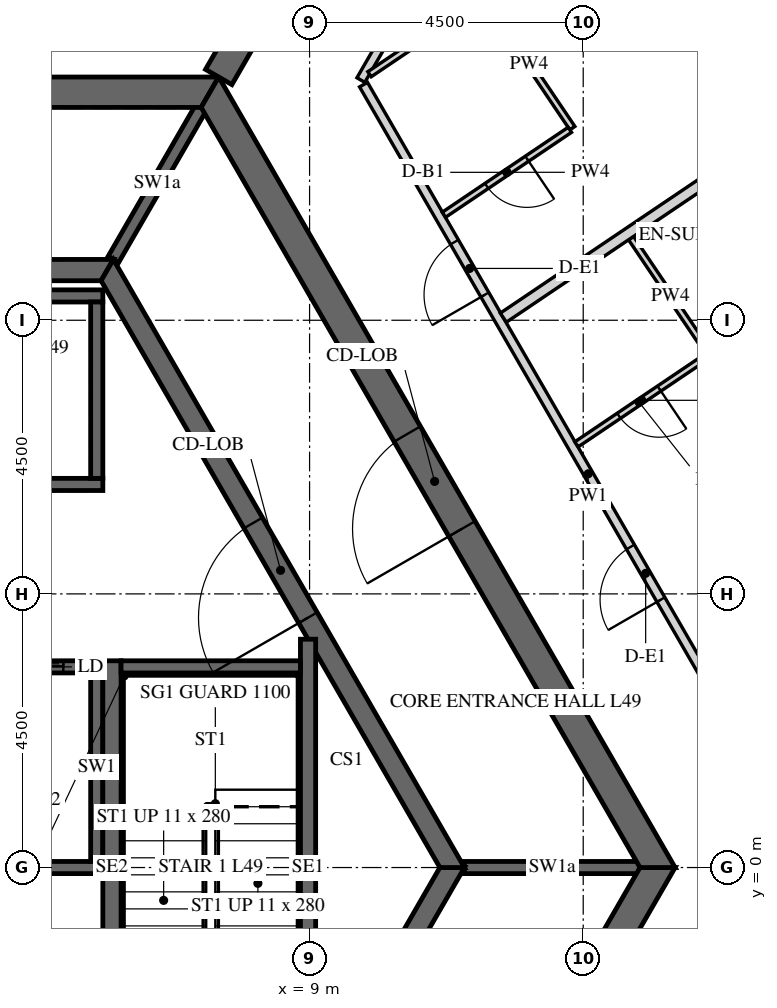
"""IFC4 building model, lengths in metres.
Left out: names, types, materials, properties, quantities, classifications, styles, units other than length and angle.
Written with IfcOpenShell. Run it as: python <this file> out.ifc"""

import sys

from ifc_helpers import new_model, si_unit, direction, frame, frame_2d, origin, place, context, subcontext, project, spatial, polyline, rectangle, outline, extrude, element, fill, save


model = new_model("IFC4")
c1 = context("Model", 3, precision=1e-05, world=origin(), true_north=direction((0.0, 1.0)))
c2 = subcontext(c1, "Body", "Model", "MODEL_VIEW")
j1 = project(units=[si_unit("LENGTHUNIT", "METRE"), si_unit("PLANEANGLEUNIT", "RADIAN")], contexts=[c1])
p1 = place(None, origin())
s1 = spatial("IfcSite", under=j1, at=p1, CompositionType="ELEMENT")
p2 = place(p1, origin())
s2 = spatial("IfcBuilding", under=s1, at=p2, CompositionType="ELEMENT")
p3 = place(p2, frame((0.0, 0.0, 207.3)))
s3 = spatial("IfcBuildingStorey", under=s2, at=p3, CompositionType="ELEMENT", Elevation=207.3)
p4 = place(p3, frame((7.361, -12.75, -0.15), z_axis=(0.0, 0.0, 1.0), x_axis=(0.50000571537, 0.866022103989, 0.0)))
e1 = element("IfcWall", 1, at=p4, inside=s3, PredefinedType="SHEAR", context=c2, shape_type="SweptSolid", body=[
    extrude(outline(polyline([(-0.144, -0.25), (14.867, -0.25), (14.578, 0.25), (0.144, 0.25), (-0.144, -0.25)])), origin(), (0.0, 0.0, 1.0), 3.9),
])
p5 = place(p4, frame((6.49, 0.0, 0.15)))
e2 = element("IfcOpeningElement", 2, at=p5, cuts=e1, PredefinedType="OPENING", context=c2, shape_type="SweptSolid", body=[
    extrude(rectangle(XDim=1.8, YDim=2.4, at=frame_2d((0.9, 1.2))), frame((0.0, 0.26, 0.0), z_axis=(0.0, -1.0, 0.0), x_axis=(1.0, 0.0, 0.0)), (0.0, 0.0, 1.0), 0.52),
])
p6 = place(p3, frame((14.722, 0.0, -0.15), z_axis=(0.0, 0.0, 1.0), x_axis=(-0.50000571537, 0.866022103989, 0.0)))
e3 = element("IfcWall", 3, at=p6, inside=s3, PredefinedType="SHEAR", context=c2, shape_type="SweptSolid", body=[
    extrude(outline(polyline([(-0.144, -0.25), (14.867, -0.25), (14.578, 0.25), (0.144, 0.25), (-0.144, -0.25)])), origin(), (0.0, 0.0, 1.0), 3.9),
])
p7 = place(p6, frame((6.432, 0.0, 0.15)))
e4 = element("IfcOpeningElement", 4, at=p7, cuts=e3, PredefinedType="OPENING", context=c2, shape_type="SweptSolid", body=[
    extrude(rectangle(XDim=1.8, YDim=2.4, at=frame_2d((0.9, 1.2))), frame((0.0, 0.26, 0.0), z_axis=(0.0, -1.0, 0.0), x_axis=(1.0, 0.0, 0.0)), (0.0, 0.0, 1.0), 0.52),
])
p8 = place(p3, frame((7.361, 12.75, -0.15), z_axis=(0.0, 0.0, 1.0), x_axis=(-1.0, 0.0, 0.0)))
e5 = element("IfcWall", 5, at=p8, inside=s3, PredefinedType="SHEAR", context=c2, shape_type="SweptSolid", body=[
    extrude(outline(polyline([(-0.144, -0.25), (14.866, -0.25), (14.578, 0.25), (0.144, 0.25), (-0.144, -0.25)])), origin(), (0.0, 0.0, 1.0), 3.9),
])
p9 = place(p8, frame((6.761, 0.0, 0.15)))
e6 = element("IfcOpeningElement", 6, at=p9, cuts=e5, PredefinedType="OPENING", context=c2, shape_type="SweptSolid", body=[
    extrude(rectangle(XDim=1.2, YDim=2.4, at=frame_2d((0.6, 1.2))), frame((0.0, 0.26, 0.0), z_axis=(0.0, -1.0, 0.0), x_axis=(1.0, 0.0, 0.0)), (0.0, 0.0, 1.0), 0.52),
])
p10 = place(p3, frame((7.506, 13.0, -0.15), z_axis=(0.0, 0.0, 1.0), x_axis=(0.499988271576, 0.866032175087, 0.0)))
e7 = element("IfcWall", 7, at=p10, inside=s3, PredefinedType="SHEAR", context=c2, shape_type="SweptSolid", body=[
    extrude(rectangle(XDim=15.424, YDim=0.5, at=frame_2d((7.712, 0.0))), origin(), (0.0, 0.0, 1.0), 3.9),
])
p11 = place(p10, frame((6.812, 0.0, 0.15)))
e8 = element("IfcOpeningElement", 8, at=p11, cuts=e7, PredefinedType="OPENING", context=c2, shape_type="SweptSolid", body=[
    extrude(rectangle(XDim=1.8, YDim=2.4, at=frame_2d((0.9, 1.2))), frame((0.0, 0.26, 0.0), z_axis=(0.0, -1.0, 0.0), x_axis=(1.0, 0.0, 0.0)), (0.0, 0.0, 1.0), 0.52),
])
p12 = place(p3, frame((5.673, -9.825, -0.15), z_axis=(0.0, 0.0, 1.0), x_axis=(0.499995046907, 0.866028263435, 0.0)))
e9 = element("IfcWall", 9, at=p12, inside=s3, PredefinedType="SHEAR", context=c2, shape_type="SweptSolid", body=[
    extrude(outline(polyline([(-0.101, -0.175), (11.446, -0.175), (11.244, 0.175), (0.101, 0.175), (-0.101, -0.175)])), origin(), (0.0, 0.0, 1.0), 3.9),
])
p13 = place(p12, frame((4.801, 0.0, 0.15)))
e10 = element("IfcOpeningElement", 10, at=p13, cuts=e9, PredefinedType="OPENING", context=c2, shape_type="SweptSolid", body=[
    extrude(rectangle(XDim=1.8, YDim=2.4, at=frame_2d((0.9, 1.2))), frame((0.0, 0.185, 0.0), z_axis=(0.0, -1.0, 0.0), x_axis=(1.0, 0.0, 0.0)), (0.0, 0.0, 1.0), 0.37),
])
p14 = place(p3, frame((11.345, 0.0, -0.15), z_axis=(0.0, 0.0, 1.0), x_axis=(-0.499995046907, 0.866028263435, 0.0)))
e11 = element("IfcWall", 11, at=p14, inside=s3, PredefinedType="SHEAR", context=c2, shape_type="SweptSolid", body=[
    extrude(outline(polyline([(-0.101, -0.175), (11.446, -0.175), (11.244, 0.175), (0.101, 0.175), (-0.101, -0.175)])), origin(), (0.0, 0.0, 1.0), 3.9),
])
p15 = place(p14, frame((4.744, 0.0, 0.15)))
e12 = element("IfcOpeningElement", 12, at=p15, cuts=e11, PredefinedType="OPENING", context=c2, shape_type="SweptSolid", body=[
    extrude(rectangle(XDim=1.8, YDim=2.4, at=frame_2d((0.9, 1.2))), frame((0.0, 0.185, 0.0), z_axis=(0.0, -1.0, 0.0), x_axis=(1.0, 0.0, 0.0)), (0.0, 0.0, 1.0), 0.37),
])
p16 = place(p3, frame((5.673, 9.825, -0.15), z_axis=(0.0, 0.0, 1.0), x_axis=(-1.0, 0.0, 0.0)))
e13 = element("IfcWall", 13, at=p16, inside=s3, PredefinedType="SHEAR", context=c2, shape_type="SweptSolid", body=[
    extrude(outline(polyline([(-0.101, -0.175), (11.446, -0.175), (11.244, 0.175), (0.101, 0.175), (-0.101, -0.175)])), origin(), (0.0, 0.0, 1.0), 3.9),
])
p17 = place(p3, frame((-5.6, 6.3, -0.25), z_axis=(0.0, 0.0, 1.0), x_axis=(1.0, 0.0, 0.0)))
e14 = element("IfcWall", 14, at=p17, inside=s3, PredefinedType="SHEAR", context=c2, shape_type="SweptSolid", body=[
    extrude(rectangle(XDim=11.2, YDim=0.2, at=frame_2d((5.6, 0.0))), origin(), (0.0, 0.0, 1.0), 3.9),
])
p18 = place(p17, frame((8.45, 0.0, 0.25)))
e15 = element("IfcOpeningElement", 15, at=p18, cuts=e14, PredefinedType="OPENING", context=c2, shape_type="SweptSolid", body=[
    extrude(rectangle(XDim=0.9, YDim=2.1, at=frame_2d((0.45, 1.05))), frame((0.0, 0.11, 0.0), z_axis=(0.0, -1.0, 0.0), x_axis=(1.0, 0.0, 0.0)), (0.0, 0.0, 1.0), 0.22),
])
p19 = place(p17, frame((0.65, 0.0, 0.25)))
e16 = element("IfcOpeningElement", 16, at=p19, cuts=e14, PredefinedType="OPENING", context=c2, shape_type="SweptSolid", body=[
    extrude(rectangle(XDim=1.1, YDim=2.1, at=frame_2d((0.55, 1.05))), frame((0.0, 0.11, 0.0), z_axis=(0.0, -1.0, 0.0), x_axis=(1.0, 0.0, 0.0)), (0.0, 0.0, 1.0), 0.22),
])
p20 = place(p17, frame((2.85, 0.0, 0.25)))
e17 = element("IfcOpeningElement", 17, at=p20, cuts=e14, PredefinedType="OPENING", context=c2, shape_type="SweptSolid", body=[
    extrude(rectangle(XDim=1.1, YDim=2.1, at=frame_2d((0.55, 1.05))), frame((0.0, 0.11, 0.0), z_axis=(0.0, -1.0, 0.0), x_axis=(1.0, 0.0, 0.0)), (0.0, 0.0, 1.0), 0.22),
])
p21 = place(p17, frame((5.05, 0.0, 0.25)))
e18 = element("IfcOpeningElement", 18, at=p21, cuts=e14, PredefinedType="OPENING", context=c2, shape_type="SweptSolid", body=[
    extrude(rectangle(XDim=1.1, YDim=2.1, at=frame_2d((0.55, 1.05))), frame((0.0, 0.11, 0.0), z_axis=(0.0, -1.0, 0.0), x_axis=(1.0, 0.0, 0.0)), (0.0, 0.0, 1.0), 0.22),
])
p22 = place(p3, frame((-5.6, 9.4, -0.25), z_axis=(0.0, 0.0, 1.0), x_axis=(1.0, 0.0, 0.0)))
e19 = element("IfcWall", 19, at=p22, inside=s3, PredefinedType="SHEAR", context=c2, shape_type="SweptSolid", body=[
    extrude(rectangle(XDim=11.2, YDim=0.2, at=frame_2d((5.6, 0.0))), origin(), (0.0, 0.0, 1.0), 3.9),
])
p23 = place(p3, frame((5.5, 6.4, -0.25), z_axis=(0.0, 0.0, 1.0), x_axis=(0.0, 1.0, 0.0)))
e20 = element("IfcWall", 20, at=p23, inside=s3, PredefinedType="SHEAR", context=c2, shape_type="SweptSolid", body=[
    extrude(rectangle(XDim=2.9, YDim=0.2, at=frame_2d((1.45, 0.0))), origin(), (0.0, 0.0, 1.0), 3.9),
])
p24 = place(p3, frame((-5.6, 3.3, -0.25), z_axis=(0.0, 0.0, 1.0), x_axis=(1.0, 0.0, 0.0)))
e21 = element("IfcWall", 21, at=p24, inside=s3, PredefinedType="SHEAR", context=c2, shape_type="SweptSolid", body=[
    extrude(rectangle(XDim=11.2, YDim=0.2, at=frame_2d((5.6, 0.0))), origin(), (0.0, 0.0, 1.0), 3.9),
])
p25 = place(p24, frame((0.65, 0.0, 0.25)))
e22 = element("IfcOpeningElement", 22, at=p25, cuts=e21, PredefinedType="OPENING", context=c2, shape_type="SweptSolid", body=[
    extrude(rectangle(XDim=1.1, YDim=2.1, at=frame_2d((0.55, 1.05))), frame((0.0, 0.11, 0.0), z_axis=(0.0, -1.0, 0.0), x_axis=(1.0, 0.0, 0.0)), (0.0, 0.0, 1.0), 0.22),
])
p26 = place(p24, frame((2.85, 0.0, 0.25)))
e23 = element("IfcOpeningElement", 23, at=p26, cuts=e21, PredefinedType="OPENING", context=c2, shape_type="SweptSolid", body=[
    extrude(rectangle(XDim=1.1, YDim=2.1, at=frame_2d((0.55, 1.05))), frame((0.0, 0.11, 0.0), z_axis=(0.0, -1.0, 0.0), x_axis=(1.0, 0.0, 0.0)), (0.0, 0.0, 1.0), 0.22),
])
p27 = place(p24, frame((5.05, 0.0, 0.25)))
e24 = element("IfcOpeningElement", 24, at=p27, cuts=e21, PredefinedType="OPENING", context=c2, shape_type="SweptSolid", body=[
    extrude(rectangle(XDim=1.1, YDim=2.1, at=frame_2d((0.55, 1.05))), frame((0.0, 0.11, 0.0), z_axis=(0.0, -1.0, 0.0), x_axis=(1.0, 0.0, 0.0)), (0.0, 0.0, 1.0), 0.22),
])
p28 = place(p24, frame((7.25, 0.0, 0.25)))
e25 = element("IfcOpeningElement", 25, at=p28, cuts=e21, PredefinedType="OPENING", context=c2, shape_type="SweptSolid", body=[
    extrude(rectangle(XDim=1.1, YDim=2.1, at=frame_2d((0.55, 1.05))), frame((0.0, 0.11, 0.0), z_axis=(0.0, -1.0, 0.0), x_axis=(1.0, 0.0, 0.0)), (0.0, 0.0, 1.0), 0.22),
])
p29 = place(p24, frame((9.45, 0.0, 0.25)))
e26 = element("IfcOpeningElement", 26, at=p29, cuts=e21, PredefinedType="OPENING", context=c2, shape_type="SweptSolid", body=[
    extrude(rectangle(XDim=1.1, YDim=2.1, at=frame_2d((0.55, 1.05))), frame((0.0, 0.11, 0.0), z_axis=(0.0, -1.0, 0.0), x_axis=(1.0, 0.0, 0.0)), (0.0, 0.0, 1.0), 0.22),
])
p30 = place(p3, frame((-5.6, 0.0, -0.25), z_axis=(0.0, 0.0, 1.0), x_axis=(1.0, 0.0, 0.0)))
e27 = element("IfcWall", 27, at=p30, inside=s3, PredefinedType="SHEAR", context=c2, shape_type="SweptSolid", body=[
    extrude(rectangle(XDim=11.2, YDim=0.2, at=frame_2d((5.6, 0.0))), origin(), (0.0, 0.0, 1.0), 3.9),
])
p31 = place(p3, frame((5.5, 0.1, -0.25), z_axis=(0.0, 0.0, 1.0), x_axis=(0.0, 1.0, 0.0)))
e28 = element("IfcWall", 28, at=p31, inside=s3, PredefinedType="SHEAR", context=c2, shape_type="SweptSolid", body=[
    extrude(rectangle(XDim=3.1, YDim=0.2, at=frame_2d((1.55, 0.0))), origin(), (0.0, 0.0, 1.0), 3.9),
])
for number, where, z_axis, x_axis in (
    (29, (11.547, 0.0, -0.15), (0.0, 0.0, 1.0), (1.0, 0.0, 0.0)),
    (30, (5.773, 10.0, -0.15), (0.0, 0.0, 1.0), (0.5, 0.866, 0.0)),
):
    element("IfcWall", number, at=place(p3, frame(where, z_axis=z_axis, x_axis=x_axis)), inside=s3, PredefinedType="SHEAR", context=c2, shape_type="SweptSolid", body=[
        extrude(rectangle(XDim=2.887, YDim=0.2, at=frame_2d((1.443, 0.0))), origin(), (0.0, 0.0, 1.0), 3.9),
    ])
p32 = place(p3, frame((5.75, -3.4, -0.25), z_axis=(0.0, 0.0, 1.0), x_axis=(0.0, 1.0, 0.0)))
e31 = element("IfcWall", 31, at=p32, inside=s3, PredefinedType="SHEAR", context=c2, shape_type="SweptSolid", body=[
    extrude(rectangle(XDim=6.8, YDim=0.3, at=frame_2d((3.4, 0.0))), origin(), (0.0, 0.0, 1.0), 3.9),
])
p33 = place(p3, frame((8.975, -3.755, -0.25), z_axis=(0.0, 0.0, 1.0), x_axis=(0.0, 1.0, 0.0)))
e32 = element("IfcWall", 32, at=p33, inside=s3, PredefinedType="SHEAR", context=c2, shape_type="SweptSolid", body=[
    extrude(rectangle(XDim=7.51, YDim=0.25, at=frame_2d((3.755, 0.0))), origin(), (0.0, 0.0, 1.0), 3.9),
])
p34 = place(p3, frame((5.9, 3.3, -0.25), z_axis=(0.0, 0.0, 1.0), x_axis=(1.0, 0.0, 0.0)))
e33 = element("IfcWall", 33, at=p34, inside=s3, PredefinedType="SHEAR", context=c2, shape_type="SweptSolid", body=[
    extrude(rectangle(XDim=2.95, YDim=0.2, at=frame_2d((1.475, 0.0))), origin(), (0.0, 0.0, 1.0), 3.9),
])
p35 = place(p3, frame((10.887, -11.144, 0.0), z_axis=(0.0, 0.0, 1.0), x_axis=(0.500006037985, 0.866021917724, 0.0)))
e34 = element("IfcWall", 34, at=p35, inside=s3, PredefinedType="PARTITIONING", context=c2, shape_type="SweptSolid", body=[
    extrude(rectangle(XDim=12.867, YDim=0.15, at=frame_2d((6.434, 0.0))), origin(), (0.0, 0.0, 1.0), 2.988),
])
p36 = place(p35, frame((3.525, 0.0, 0.0)))
e35 = element("IfcOpeningElement", 35, at=p36, cuts=e34, PredefinedType="OPENING", context=c2, shape_type="SweptSolid", body=[
    extrude(rectangle(XDim=1.0, YDim=2.1, at=frame_2d((0.5, 1.05))), frame((0.0, 0.085, 0.0), z_axis=(0.0, -1.0, 0.0), x_axis=(1.0, 0.0, 0.0)), (0.0, 0.0, 1.0), 0.17),
])
p37 = place(p3, frame((17.277, 0.075, 0.0), z_axis=(0.0, 0.0, 1.0), x_axis=(-0.499988884089, 0.866031821464, 0.0)))
e36 = element("IfcWall", 36, at=p37, inside=s3, PredefinedType="PARTITIONING", context=c2, shape_type="SweptSolid", body=[
    extrude(rectangle(XDim=14.78, YDim=0.15, at=frame_2d((7.39, 0.0))), origin(), (0.0, 0.0, 1.0), 2.988),
])
p38 = place(p37, frame((1.001, 0.0, 0.0)))
e37 = element("IfcOpeningElement", 37, at=p38, cuts=e36, PredefinedType="OPENING", context=c2, shape_type="SweptSolid", body=[
    extrude(rectangle(XDim=1.0, YDim=2.1, at=frame_2d((0.5, 1.05))), frame((0.0, 0.085, 0.0), z_axis=(0.0, -1.0, 0.0), x_axis=(1.0, 0.0, 0.0)), (0.0, 0.0, 1.0), 0.17),
])
p39 = place(p37, frame((5.0, 0.0, 0.0)))
e38 = element("IfcOpeningElement", 38, at=p39, cuts=e36, PredefinedType="OPENING", context=c2, shape_type="SweptSolid", body=[
    extrude(rectangle(XDim=1.0, YDim=2.1, at=frame_2d((0.5, 1.05))), frame((0.0, 0.085, 0.0), z_axis=(0.0, -1.0, 0.0), x_axis=(1.0, 0.0, 0.0)), (0.0, 0.0, 1.0), 0.17),
])
p40 = place(p37, frame((10.79, 0.0, 0.0)))
e39 = element("IfcOpeningElement", 39, at=p40, cuts=e36, PredefinedType="OPENING", context=c2, shape_type="SweptSolid", body=[
    extrude(rectangle(XDim=1.0, YDim=2.1, at=frame_2d((0.5, 1.05))), frame((0.0, 0.085, 0.0), z_axis=(0.0, -1.0, 0.0), x_axis=(1.0, 0.0, 0.0)), (0.0, 0.0, 1.0), 0.17),
])
p41 = place(p3, frame((9.844, 12.95, 0.0), z_axis=(0.0, 0.0, 1.0), x_axis=(0.500003831281, 0.866023191782, 0.0)))
e40 = element("IfcWall", 40, at=p41, inside=s3, PredefinedType="PARTITIONING", context=c2, shape_type="SweptSolid", body=[
    extrude(rectangle(XDim=7.786, YDim=0.15, at=frame_2d((3.893, 0.0))), origin(), (0.0, 0.0, 1.0), 2.988),
])
p42 = place(p3, frame((14.287, 10.351, 0.0), z_axis=(0.0, 0.0, 1.0), x_axis=(0.559204176839, -0.829029968461, 0.0)))
e41 = element("IfcWall", 41, at=p42, inside=s3, PredefinedType="PARTITIONING", context=c2, shape_type="SweptSolid", body=[
    extrude(rectangle(XDim=2.31, YDim=0.1, at=frame_2d((1.155, 0.0))), origin(), (0.0, 0.0, 1.0), 2.988),
])
p43 = place(p3, frame((15.537, 8.408, 0.0), z_axis=(0.0, 0.0, 1.0), x_axis=(-0.829051810631, -0.559171794076, 0.0)))
e42 = element("IfcWall", 42, at=p43, inside=s3, PredefinedType="PARTITIONING", context=c2, shape_type="SweptSolid", body=[
    extrude(rectangle(XDim=2.591, YDim=0.1, at=frame_2d((1.295, 0.0))), origin(), (0.0, 0.0, 1.0), 2.988),
])
p44 = place(p43, frame((0.95, 0.0, 0.0)))
e43 = element("IfcOpeningElement", 43, at=p44, cuts=e42, PredefinedType="OPENING", context=c2, shape_type="SweptSolid", body=[
    extrude(rectangle(XDim=0.8, YDim=2.1, at=frame_2d((0.4, 1.05))), frame((0.0, 0.06, 0.0), z_axis=(0.0, -1.0, 0.0), x_axis=(1.0, 0.0, 0.0)), (0.0, 0.0, 1.0), 0.12),
])
p45 = place(p3, frame((22.376, 15.915, 0.0), z_axis=(0.0, 0.0, 1.0), x_axis=(-0.829034008237, -0.559198187753, 0.0)))
e44 = element("IfcWall", 44, at=p45, inside=s3, PredefinedType="PARTITIONING", context=c2, shape_type="SweptSolid", body=[
    extrude(rectangle(XDim=12.291, YDim=0.18, at=frame_2d((6.145, 0.0))), origin(), (0.0, 0.0, 1.0), 2.988),
])
p46 = place(p3, frame((9.986, 13.046, 0.0), z_axis=(0.0, 0.0, 1.0), x_axis=(0.829043139518, 0.55918465002, 0.0)))
e45 = element("IfcWall", 45, at=p46, inside=s3, PredefinedType="PARTITIONING", context=c2, shape_type="SweptSolid", body=[
    extrude(rectangle(XDim=2.27, YDim=0.1, at=frame_2d((1.135, 0.0))), origin(), (0.0, 0.0, 1.0), 2.988),
])
p47 = place(p3, frame((11.896, 14.273, 0.0), z_axis=(0.0, 0.0, 1.0), x_axis=(0.559155442782, -0.829062838878, 0.0)))
e46 = element("IfcWall", 46, at=p47, inside=s3, PredefinedType="PARTITIONING", context=c2, shape_type="SweptSolid", body=[
    extrude(rectangle(XDim=2.55, YDim=0.1, at=frame_2d((1.275, 0.0))), origin(), (0.0, 0.0, 1.0), 2.988),
])
p48 = place(p3, frame((13.28, 12.132, 0.0), z_axis=(0.0, 0.0, 1.0), x_axis=(-0.829015218944, -0.559226042634, 0.0)))
e47 = element("IfcWall", 47, at=p48, inside=s3, PredefinedType="PARTITIONING", context=c2, shape_type="SweptSolid", body=[
    extrude(rectangle(XDim=2.498, YDim=0.1, at=frame_2d((1.249, 0.0))), origin(), (0.0, 0.0, 1.0), 2.988),
])
p49 = place(p48, frame((0.85, 0.0, 0.0)))
e48 = element("IfcOpeningElement", 48, at=p49, cuts=e47, PredefinedType="OPENING", context=c2, shape_type="SweptSolid", body=[
    extrude(rectangle(XDim=0.8, YDim=2.1, at=frame_2d((0.4, 1.05))), frame((0.0, 0.06, 0.0), z_axis=(0.0, -1.0, 0.0), x_axis=(1.0, 0.0, 0.0)), (0.0, 0.0, 1.0), 0.12),
])
p50 = place(p7, origin())
e49 = element("IfcDoor", 49, at=p50, inside=s3, OperationType="DOUBLE_DOOR_SINGLE_SWING", PredefinedType="DOOR", context=c2, shape_type="SweptSolid", body=[
    extrude(rectangle(XDim=1.8, YDim=2.4, at=frame_2d((0.9, 1.2))), frame((0.0, 0.025, 0.0), z_axis=(0.0, -1.0, 0.0), x_axis=(1.0, 0.0, 0.0)), (0.0, 0.0, 1.0), 0.05),
])
fill(e4, e49)
p51 = place(p15, origin())
e50 = element("IfcDoor", 50, at=p51, inside=s3, OperationType="DOUBLE_DOOR_SINGLE_SWING", PredefinedType="DOOR", context=c2, shape_type="SweptSolid", body=[
    extrude(rectangle(XDim=1.8, YDim=2.4, at=frame_2d((0.9, 1.2))), frame((0.0, 0.025, 0.0), z_axis=(0.0, -1.0, 0.0), x_axis=(1.0, 0.0, 0.0)), (0.0, 0.0, 1.0), 0.05),
])
fill(e12, e50)
p52 = place(p29, origin())
e51 = element("IfcDoor", 51, at=p52, inside=s3, OperationType="SLIDING_TO_LEFT", PredefinedType="DOOR", context=c2, shape_type="SweptSolid", body=[
    extrude(rectangle(XDim=1.1, YDim=2.1, at=frame_2d((0.55, 1.05))), frame((0.0, 0.025, 0.0), z_axis=(0.0, -1.0, 0.0), x_axis=(1.0, 0.0, 0.0)), (0.0, 0.0, 1.0), 0.05),
])
fill(e26, e51)
p53 = place(p39, origin())
e52 = element("IfcDoor", 52, at=p53, inside=s3, OperationType="SINGLE_SWING_LEFT", PredefinedType="DOOR", context=c2, shape_type="SweptSolid", body=[
    extrude(rectangle(XDim=1.0, YDim=2.1, at=frame_2d((0.5, 1.05))), frame((0.0, 0.025, 0.0), z_axis=(0.0, -1.0, 0.0), x_axis=(1.0, 0.0, 0.0)), (0.0, 0.0, 1.0), 0.05),
])
fill(e38, e52)
p54 = place(p44, origin())
e53 = element("IfcDoor", 53, at=p54, inside=s3, OperationType="SINGLE_SWING_LEFT", PredefinedType="DOOR", context=c2, shape_type="SweptSolid", body=[
    extrude(rectangle(XDim=0.8, YDim=2.1, at=frame_2d((0.4, 1.05))), frame((0.0, 0.025, 0.0), z_axis=(0.0, -1.0, 0.0), x_axis=(1.0, 0.0, 0.0)), (0.0, 0.0, 1.0), 0.05),
])
fill(e43, e53)
p55 = place(p40, origin())
e54 = element("IfcDoor", 54, at=p55, inside=s3, OperationType="SINGLE_SWING_RIGHT", PredefinedType="DOOR", context=c2, shape_type="SweptSolid", body=[
    extrude(rectangle(XDim=1.0, YDim=2.1, at=frame_2d((0.5, 1.05))), frame((0.0, 0.025, 0.0), z_axis=(0.0, -1.0, 0.0), x_axis=(1.0, 0.0, 0.0)), (0.0, 0.0, 1.0), 0.05),
])
fill(e39, e54)
p56 = place(p49, origin())
e55 = element("IfcDoor", 55, at=p56, inside=s3, OperationType="SINGLE_SWING_LEFT", PredefinedType="DOOR", context=c2, shape_type="SweptSolid", body=[
    extrude(rectangle(XDim=0.8, YDim=2.1, at=frame_2d((0.4, 1.05))), frame((0.0, 0.025, 0.0), z_axis=(0.0, -1.0, 0.0), x_axis=(1.0, 0.0, 0.0)), (0.0, 0.0, 1.0), 0.05),
])
fill(e48, e55)
save(model, sys.argv[1])
